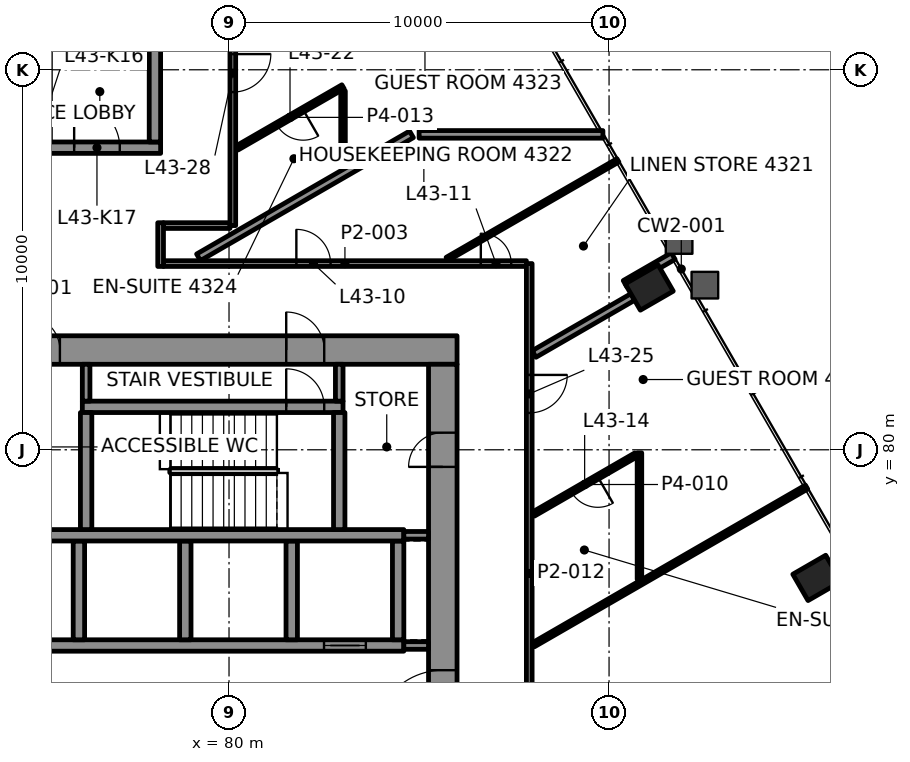
"""IFC4 building model, lengths in metres.
Left out: names, types, materials, properties, quantities, classifications, styles, units other than length and angle.
Written with IfcOpenShell. Run it as: python <this file> out.ifc"""

import sys

from ifc_helpers import new_model, si_unit, direction, frame, frame_2d, origin, origin_2d, place, context, subcontext, project, spatial, rectangle, hollow_rectangle, extrude, element, fill, save


model = new_model("IFC4")
c1 = context("Model", 3, precision=1e-05, world=origin(), true_north=direction((0.0, 1.0)))
c2 = subcontext(c1, "Body", "Model", "MODEL_VIEW")
j1 = project(units=[si_unit("LENGTHUNIT", "METRE"), si_unit("PLANEANGLEUNIT", "RADIAN")], contexts=[c1])
p1 = place(None, origin())
s1 = spatial("IfcSite", under=j1, at=p1, CompositionType="ELEMENT")
p2 = place(p1, origin())
s2 = spatial("IfcBuilding", under=s1, at=p2, CompositionType="ELEMENT")
p3 = place(p2, frame((0.0, 0.0, 187.0)))
s3 = spatial("IfcBuildingStorey", under=s2, at=p3, CompositionType="ELEMENT", Elevation=187.0)
for number, where, z_axis, x_axis in (
    (1, (95.468, 76.628, -0.0), (0.0, 0.0, 1.0), (-0.5, 0.866, 0.0)),
    (2, (91.056, 84.27, -0.0), (0.0, 0.0, 1.0), (-0.5, 0.866, 0.0)),
):
    element("IfcColumn", number, at=place(p3, frame(where, z_axis=z_axis, x_axis=x_axis)), inside=s3, PredefinedType="COLUMN", context=c2, shape_type="SweptSolid", body=[
        extrude(hollow_rectangle(XDim=0.8, YDim=1.0, WallThickness=0.05, at=origin_2d()), origin(), (0.0, 0.0, 1.0), 3.9),
    ])
p4 = place(p3, frame((64.0, 82.625, 0.0), z_axis=(0.0, 0.0, 1.0), x_axis=(1.0, 0.0, 0.0)))
e3 = element("IfcWall", 3, at=p4, inside=s3, PredefinedType="SHEAR", context=c2, shape_type="SweptSolid", body=[
    extrude(rectangle(XDim=22.0, YDim=0.75, at=frame_2d((11.0, 0.0))), origin(), (0.0, 0.0, 1.0), 3.7),
])
p5 = place(p4, frame((3.695, 0.0, 0.0)))
e4 = element("IfcOpeningElement", 4, at=p5, cuts=e3, PredefinedType="OPENING", context=c2, shape_type="SweptSolid", body=[
    extrude(rectangle(XDim=1.0, YDim=2.1, at=frame_2d((0.5, 1.05))), frame((0.0, 0.385, 0.0), z_axis=(0.0, -1.0, 0.0), x_axis=(1.0, 0.0, 0.0)), (0.0, 0.0, 1.0), 0.77),
])
p6 = place(p4, frame((17.505, 0.0, 0.0)))
e5 = element("IfcOpeningElement", 5, at=p6, cuts=e3, PredefinedType="OPENING", context=c2, shape_type="SweptSolid", body=[
    extrude(rectangle(XDim=1.0, YDim=2.1, at=frame_2d((0.5, 1.05))), frame((0.0, 0.385, 0.0), z_axis=(0.0, -1.0, 0.0), x_axis=(1.0, 0.0, 0.0)), (0.0, 0.0, 1.0), 0.77),
])
p7 = place(p4, frame((10.65, 0.0, 0.0)))
e6 = element("IfcOpeningElement", 6, at=p7, cuts=e3, PredefinedType="OPENING", context=c2, shape_type="SweptSolid", body=[
    extrude(rectangle(XDim=0.9, YDim=2.1, at=frame_2d((0.45, 1.05))), frame((0.0, 0.385, 0.0), z_axis=(0.0, -1.0, 0.0), x_axis=(1.0, 0.0, 0.0)), (0.0, 0.0, 1.0), 0.77),
])
p8 = place(p3, frame((85.625, 67.75, 0.0), z_axis=(0.0, 0.0, 1.0), x_axis=(0.0, 1.0, 0.0)))
e7 = element("IfcWall", 7, at=p8, inside=s3, PredefinedType="SHEAR", context=c2, shape_type="SweptSolid", body=[
    extrude(rectangle(XDim=14.5, YDim=0.75, at=frame_2d((7.25, 0.0))), origin(), (0.0, 0.0, 1.0), 3.7),
])
p9 = place(p8, frame((4.65, 0.0, 0.0)))
e8 = element("IfcOpeningElement", 8, at=p9, cuts=e7, PredefinedType="OPENING", context=c2, shape_type="SweptSolid", body=[
    extrude(rectangle(XDim=1.8, YDim=2.1, at=frame_2d((0.9, 1.05))), frame((0.0, 0.385, 0.0), z_axis=(0.0, -1.0, 0.0), x_axis=(1.0, 0.0, 0.0)), (0.0, 0.0, 1.0), 0.77),
])
p10 = place(p8, frame((11.8, 0.0, 0.0)))
e9 = element("IfcOpeningElement", 9, at=p10, cuts=e7, PredefinedType="OPENING", context=c2, shape_type="SweptSolid", body=[
    extrude(rectangle(XDim=0.9, YDim=2.1, at=frame_2d((0.45, 1.05))), frame((0.0, 0.385, 0.0), z_axis=(0.0, -1.0, 0.0), x_axis=(1.0, 0.0, 0.0)), (0.0, 0.0, 1.0), 0.77),
])
p11 = place(p3, frame((70.3, 74.85, 0.0), z_axis=(0.0, 0.0, 1.0), x_axis=(1.0, 0.0, 0.0)))
e10 = element("IfcWall", 10, at=p11, inside=s3, PredefinedType="SHEAR", context=c2, shape_type="SweptSolid", body=[
    extrude(rectangle(XDim=14.3, YDim=0.3, at=frame_2d((7.15, 0.0))), origin(), (0.0, 0.0, 1.0), 3.7),
])
p12 = place(p11, frame((3.8, 0.0, 0.0)))
e11 = element("IfcOpeningElement", 11, at=p12, cuts=e10, PredefinedType="OPENING", context=c2, shape_type="SweptSolid", body=[
    extrude(rectangle(XDim=1.1, YDim=2.1, at=frame_2d((0.55, 1.05))), frame((0.0, 0.16, 0.0), z_axis=(0.0, -1.0, 0.0), x_axis=(1.0, 0.0, 0.0)), (0.0, 0.0, 1.0), 0.32),
])
p13 = place(p11, frame((12.2, 0.0, 0.0)))
e12 = element("IfcOpeningElement", 12, at=p13, cuts=e10, PredefinedType="OPENING", context=c2, shape_type="SweptSolid", body=[
    extrude(rectangle(XDim=1.1, YDim=2.1, at=frame_2d((0.55, 1.05))), frame((0.0, 0.16, 0.0), z_axis=(0.0, -1.0, 0.0), x_axis=(1.0, 0.0, 0.0)), (0.0, 0.0, 1.0), 0.32),
])
for number, where, z_axis, x_axis in (
    (13, (76.05, 75.0, 0.0), (0.0, 0.0, 1.0), (0.0, 1.0, 0.0)),
    (14, (78.85, 75.0, 0.0), (0.0, 0.0, 1.0), (0.0, 1.0, 0.0)),
    (15, (81.65, 75.0, 0.0), (0.0, 0.0, 1.0), (0.0, 1.0, 0.0)),
    (16, (84.45, 75.0, 0.0), (0.0, 0.0, 1.0), (0.0, 1.0, 0.0)),
):
    element("IfcWall", number, at=place(p3, frame(where, z_axis=z_axis, x_axis=x_axis)), inside=s3, PredefinedType="SHEAR", context=c2, shape_type="SweptSolid", body=[
        extrude(rectangle(XDim=2.6, YDim=0.3, at=frame_2d((1.3, 0.0))), origin(), (0.0, 0.0, 1.0), 3.7),
    ])
p14 = place(p3, frame((67.15, 77.75, 0.0), z_axis=(0.0, 0.0, 1.0), x_axis=(1.0, 0.0, 0.0)))
e17 = element("IfcWall", 17, at=p14, inside=s3, PredefinedType="SHEAR", context=c2, shape_type="SweptSolid", body=[
    extrude(rectangle(XDim=17.45, YDim=0.3, at=frame_2d((8.725, 0.0))), origin(), (0.0, 0.0, 1.0), 3.7),
])
p15 = place(p14, frame((0.545, 0.0, 0.0)))
e18 = element("IfcOpeningElement", 18, at=p15, cuts=e17, PredefinedType="OPENING", context=c2, shape_type="SweptSolid", body=[
    extrude(rectangle(XDim=1.0, YDim=2.1, at=frame_2d((0.5, 1.05))), frame((0.0, 0.16, 0.0), z_axis=(0.0, -1.0, 0.0), x_axis=(1.0, 0.0, 0.0)), (0.0, 0.0, 1.0), 0.32),
])
p16 = place(p3, frame((76.14, 81.13, 0.0), z_axis=(0.0, 0.0, 1.0), x_axis=(1.0, 0.0, 0.0)))
e19 = element("IfcWall", 19, at=p16, inside=s3, PredefinedType="SHEAR", context=c2, shape_type="SweptSolid", body=[
    extrude(rectangle(XDim=6.86, YDim=0.3, at=frame_2d((3.43, 0.0))), origin(), (0.0, 0.0, 1.0), 3.7),
])
p17 = place(p16, frame((5.365, 0.0, 0.0)))
e20 = element("IfcOpeningElement", 20, at=p17, cuts=e19, PredefinedType="OPENING", context=c2, shape_type="SweptSolid", body=[
    extrude(rectangle(XDim=1.0, YDim=2.1, at=frame_2d((0.5, 1.05))), frame((0.0, 0.16, 0.0), z_axis=(0.0, -1.0, 0.0), x_axis=(1.0, 0.0, 0.0)), (0.0, 0.0, 1.0), 0.32),
])
for number, where, z_axis, x_axis in (
    (21, (76.24, 77.9, 0.0), (0.0, 0.0, 1.0), (0.0, 1.0, 0.0)),
    (22, (82.9, 77.9, 0.0), (0.0, 0.0, 1.0), (0.0, 1.0, 0.0)),
):
    element("IfcWall", number, at=place(p3, frame(where, z_axis=z_axis, x_axis=x_axis)), inside=s3, PredefinedType="SHEAR", context=c2, shape_type="SweptSolid", body=[
        extrude(rectangle(XDim=3.08, YDim=0.3, at=frame_2d((1.54, 0.0))), origin(), (0.0, 0.0, 1.0), 3.7),
    ])
p18 = place(p3, frame((71.8, 87.95, 0.0), z_axis=(0.0, 0.0, 1.0), x_axis=(1.0, 0.0, 0.0)))
e23 = element("IfcWall", 23, at=p18, inside=s3, PredefinedType="SHEAR", context=c2, shape_type="SweptSolid", body=[
    extrude(rectangle(XDim=6.4, YDim=0.3, at=frame_2d((3.2, 0.0))), origin(), (0.0, 0.0, 1.0), 3.7),
])
p19 = place(p18, frame((1.325, 0.0, 0.0)))
e24 = element("IfcOpeningElement", 24, at=p19, cuts=e23, PredefinedType="OPENING", context=c2, shape_type="SweptSolid", body=[
    extrude(rectangle(XDim=1.0, YDim=2.1, at=frame_2d((0.5, 1.05))), frame((0.0, 0.16, 0.0), z_axis=(0.0, -1.0, 0.0), x_axis=(1.0, 0.0, 0.0)), (0.0, 0.0, 1.0), 0.32),
])
p20 = place(p18, frame((4.125, 0.0, 0.0)))
e25 = element("IfcOpeningElement", 25, at=p20, cuts=e23, PredefinedType="OPENING", context=c2, shape_type="SweptSolid", body=[
    extrude(rectangle(XDim=1.2, YDim=2.1, at=frame_2d((0.6, 1.05))), frame((0.0, 0.16, 0.0), z_axis=(0.0, -1.0, 0.0), x_axis=(1.0, 0.0, 0.0)), (0.0, 0.0, 1.0), 0.32),
])
p21 = place(p3, frame((78.05, 88.1, 0.0), z_axis=(0.0, 0.0, 1.0), x_axis=(0.0, 1.0, 0.0)))
e26 = element("IfcWall", 26, at=p21, inside=s3, PredefinedType="SHEAR", context=c2, shape_type="SweptSolid", body=[
    extrude(rectangle(XDim=6.2, YDim=0.3, at=frame_2d((3.1, 0.0))), origin(), (0.0, 0.0, 1.0), 3.7),
])
p22 = place(p3, frame((78.275, 84.9, 0.0), z_axis=(0.0, 0.0, 1.0), x_axis=(1.0, 0.0, 0.0)))
e27 = element("IfcWall", 27, at=p22, inside=s3, PredefinedType="PARTITIONING", context=c2, shape_type="SweptSolid", body=[
    extrude(rectangle(XDim=9.55, YDim=0.15, at=frame_2d((4.775, 0.0))), origin(), (0.0, 0.0, 1.0), 3.1),
])
p23 = place(p22, frame((3.497, 0.0, 0.0)))
e28 = element("IfcOpeningElement", 28, at=p23, cuts=e27, PredefinedType="OPENING", context=c2, shape_type="SweptSolid", body=[
    extrude(rectangle(XDim=0.9, YDim=2.1, at=frame_2d((0.45, 1.05))), frame((0.0, 0.085, 0.0), z_axis=(0.0, -1.0, 0.0), x_axis=(1.0, 0.0, 0.0)), (0.0, 0.0, 1.0), 0.17),
])
p24 = place(p22, frame((8.351, 0.0, 0.0)))
e29 = element("IfcOpeningElement", 29, at=p24, cuts=e27, PredefinedType="OPENING", context=c2, shape_type="SweptSolid", body=[
    extrude(rectangle(XDim=0.8, YDim=2.1, at=frame_2d((0.4, 1.05))), frame((0.0, 0.085, 0.0), z_axis=(0.0, -1.0, 0.0), x_axis=(1.0, 0.0, 0.0)), (0.0, 0.0, 1.0), 0.17),
])
p25 = place(p3, frame((78.275, 85.9, 0.0), z_axis=(0.0, 0.0, 1.0), x_axis=(1.0, 0.0, 0.0)))
e30 = element("IfcWall", 30, at=p25, inside=s3, PredefinedType="PARTITIONING", context=c2, shape_type="SweptSolid", body=[
    extrude(rectangle(XDim=1.75, YDim=0.15, at=frame_2d((0.875, 0.0))), origin(), (0.0, 0.0, 1.0), 3.1),
])
p26 = place(p3, frame((83.06, 87.8, 0.0), z_axis=(0.0, 0.0, 1.0), x_axis=(1.0, 0.0, 0.0)))
e31 = element("IfcWall", 31, at=p26, inside=s3, PredefinedType="PARTITIONING", context=c2, shape_type="SweptSolid", body=[
    extrude(rectangle(XDim=0.564, YDim=0.12, at=frame_2d((0.282, 0.0))), origin(), (0.0, 0.0, 1.0), 3.1),
])
p27 = place(p3, frame((85.002, 88.3, 0.0), z_axis=(0.0, 0.0, 1.0), x_axis=(1.0, 0.0, 0.0)))
e32 = element("IfcWall", 32, at=p27, inside=s3, PredefinedType="PARTITIONING", context=c2, shape_type="SweptSolid", body=[
    extrude(rectangle(XDim=4.836, YDim=0.2, at=frame_2d((2.418, 0.0))), origin(), (0.0, 0.0, 1.0), 3.022),
])
p28 = place(p3, frame((88.01, 74.869, 0.0), z_axis=(0.0, 0.0, 1.0), x_axis=(0.866025877972, 0.499999178681, 0.0)))
e33 = element("IfcWall", 33, at=p28, inside=s3, PredefinedType="PARTITIONING", context=c2, shape_type="SweptSolid", body=[
    extrude(rectangle(XDim=8.299, YDim=0.12, at=frame_2d((4.149, 0.0))), origin(), (0.0, 0.0, 1.0), 3.022),
])
p29 = place(p3, frame((90.705, 79.865, 0.0), z_axis=(0.0, 0.0, 1.0), x_axis=(-0.866009247561, -0.500027982357, 0.0)))
e34 = element("IfcWall", 34, at=p29, inside=s3, PredefinedType="PARTITIONING", context=c2, shape_type="SweptSolid", body=[
    extrude(rectangle(XDim=3.113, YDim=0.12, at=frame_2d((1.556, 0.0))), origin(), (0.0, 0.0, 1.0), 3.1),
])
p30 = place(p29, frame((1.156, 0.0, 0.0)))
e35 = element("IfcOpeningElement", 35, at=p30, cuts=e34, PredefinedType="OPENING", context=c2, shape_type="SweptSolid", body=[
    extrude(rectangle(XDim=0.8, YDim=2.1, at=frame_2d((0.4, 1.05))), frame((0.0, 0.07, 0.0), z_axis=(0.0, -1.0, 0.0), x_axis=(1.0, 0.0, 0.0)), (0.0, 0.0, 1.0), 0.14),
])
p31 = place(p3, frame((88.027, 82.521, 0.0), z_axis=(0.0, 0.0, 1.0), x_axis=(0.866029639064, 0.499992664208, 0.0)))
e36 = element("IfcWall", 36, at=p31, inside=s3, PredefinedType="PARTITIONING", context=c2, shape_type="SweptSolid", body=[
    extrude(rectangle(XDim=2.998, YDim=0.2, at=frame_2d((1.499, 0.0))), origin(), (0.0, 0.0, 1.0), 3.1),
])
p32 = place(p3, frame((90.423, 84.367, 0.0), z_axis=(0.0, 0.0, 1.0), x_axis=(0.866032430508, 0.49998782916, 0.0)))
e37 = element("IfcWall", 37, at=p32, inside=s3, PredefinedType="PARTITIONING", context=c2, shape_type="SweptSolid", body=[
    extrude(rectangle(XDim=1.46, YDim=0.2, at=frame_2d((0.73, 0.0))), origin(), (0.0, 0.0, 1.0), 3.022),
])
p33 = place(p3, frame((85.737, 85.02, 0.0), z_axis=(0.0, 0.0, 1.0), x_axis=(0.866014867177, 0.500018249495, 0.0)))
e38 = element("IfcWall", 38, at=p33, inside=s3, PredefinedType="PARTITIONING", context=c2, shape_type="SweptSolid", body=[
    extrude(rectangle(XDim=5.192, YDim=0.1, at=frame_2d((2.596, 0.0))), origin(), (0.0, 0.0, 1.0), 3.022),
])
p34 = place(p3, frame((79.197, 85.065, 0.0), z_axis=(0.0, 0.0, 1.0), x_axis=(0.86602410867, 0.500002243197, 0.0)))
e39 = element("IfcWall", 39, at=p34, inside=s3, PredefinedType="PARTITIONING", context=c2, shape_type="SweptSolid", body=[
    extrude(rectangle(XDim=6.471, YDim=0.2, at=frame_2d((3.235, 0.0))), origin(), (0.0, 0.0, 1.0), 3.1),
])
p35 = place(p3, frame((83.0, 89.553, 0.0), z_axis=(0.0, 0.0, 1.0), x_axis=(-0.86604299788, -0.499969524894, 0.0)))
e40 = element("IfcWall", 40, at=p35, inside=s3, PredefinedType="PARTITIONING", context=c2, shape_type="SweptSolid", body=[
    extrude(rectangle(XDim=3.222, YDim=0.12, at=frame_2d((1.611, 0.0))), origin(), (0.0, 0.0, 1.0), 3.1),
])
p36 = place(p35, frame((1.211, 0.0, 0.0)))
e41 = element("IfcOpeningElement", 41, at=p36, cuts=e40, PredefinedType="OPENING", context=c2, shape_type="SweptSolid", body=[
    extrude(rectangle(XDim=0.8, YDim=2.1, at=frame_2d((0.4, 1.05))), frame((0.0, 0.07, 0.0), z_axis=(0.0, -1.0, 0.0), x_axis=(1.0, 0.0, 0.0)), (0.0, 0.0, 1.0), 0.14),
])
p37 = place(p3, frame((90.8, 76.59, 0.0), z_axis=(0.0, 0.0, 1.0), x_axis=(0.0, 1.0, 0.0)))
e42 = element("IfcWall", 42, at=p37, inside=s3, PredefinedType="PARTITIONING", context=c2, shape_type="SweptSolid", body=[
    extrude(rectangle(XDim=3.329, YDim=0.12, at=frame_2d((1.665, 0.0))), origin(), (0.0, 0.0, 1.0), 3.1),
])
p38 = place(p3, frame((87.9, 84.9, 0.0), z_axis=(0.0, 0.0, 1.0), x_axis=(0.0, -1.0, 0.0)))
e43 = element("IfcWall", 43, at=p38, inside=s3, PredefinedType="PARTITIONING", context=c2, shape_type="SweptSolid", body=[
    extrude(rectangle(XDim=16.308, YDim=0.15, at=frame_2d((8.154, 0.0))), origin(), (0.0, 0.0, 1.0), 3.1),
])
p39 = place(p38, frame((2.93, 0.0, 0.0)))
e44 = element("IfcOpeningElement", 44, at=p39, cuts=e43, PredefinedType="OPENING", context=c2, shape_type="SweptSolid", body=[
    extrude(rectangle(XDim=1.0, YDim=2.1, at=frame_2d((0.5, 1.05))), frame((0.0, 0.085, 0.0), z_axis=(0.0, -1.0, 0.0), x_axis=(1.0, 0.0, 0.0)), (0.0, 0.0, 1.0), 0.17),
])
p40 = place(p38, frame((12.5, 0.0, 0.0)))
e45 = element("IfcOpeningElement", 45, at=p40, cuts=e43, PredefinedType="OPENING", context=c2, shape_type="SweptSolid", body=[
    extrude(rectangle(XDim=1.2, YDim=2.1, at=frame_2d((0.6, 1.05))), frame((0.0, 0.085, 0.0), z_axis=(0.0, -1.0, 0.0), x_axis=(1.0, 0.0, 0.0)), (0.0, 0.0, 1.0), 0.17),
])
p41 = place(p3, frame((83.0, 87.8, 0.0), z_axis=(0.0, 0.0, 1.0), x_axis=(0.0, 1.0, 0.0)))
e46 = element("IfcWall", 46, at=p41, inside=s3, PredefinedType="PARTITIONING", context=c2, shape_type="SweptSolid", body=[
    extrude(rectangle(XDim=1.644, YDim=0.12, at=frame_2d((0.822, 0.0))), origin(), (0.0, 0.0, 1.0), 3.1),
])
p42 = place(p3, frame((80.1, 96.5, 0.0), z_axis=(0.0, 0.0, 1.0), x_axis=(0.0, -1.0, 0.0)))
e47 = element("IfcWall", 47, at=p42, inside=s3, PredefinedType="PARTITIONING", context=c2, shape_type="SweptSolid", body=[
    extrude(rectangle(XDim=10.6, YDim=0.15, at=frame_2d((5.3, 0.0))), origin(), (0.0, 0.0, 1.0), 3.022),
])
p43 = place(p42, frame((0.377, 0.0, 0.0)))
e48 = element("IfcOpeningElement", 48, at=p43, cuts=e47, PredefinedType="OPENING", context=c2, shape_type="SweptSolid", body=[
    extrude(rectangle(XDim=1.0, YDim=2.1, at=frame_2d((0.5, 1.05))), frame((0.0, 0.085, 0.0), z_axis=(0.0, -1.0, 0.0), x_axis=(1.0, 0.0, 0.0)), (0.0, 0.0, 1.0), 0.17),
])
p44 = place(p42, frame((6.087, 0.0, 0.0)))
e49 = element("IfcOpeningElement", 49, at=p44, cuts=e47, PredefinedType="OPENING", context=c2, shape_type="SweptSolid", body=[
    extrude(rectangle(XDim=1.0, YDim=2.1, at=frame_2d((0.5, 1.05))), frame((0.0, 0.085, 0.0), z_axis=(0.0, -1.0, 0.0), x_axis=(1.0, 0.0, 0.0)), (0.0, 0.0, 1.0), 0.17),
])
p45 = place(p3, frame((78.2, 84.825, 0.0), z_axis=(0.0, 0.0, 1.0), x_axis=(0.0, 1.0, 0.0)))
e50 = element("IfcWall", 50, at=p45, inside=s3, PredefinedType="PARTITIONING", context=c2, shape_type="SweptSolid", body=[
    extrude(rectangle(XDim=1.15, YDim=0.15, at=frame_2d((0.575, 0.0))), origin(), (0.0, 0.0, 1.0), 3.1),
])
for number, where, z_axis, x_axis in (
    (51, (84.6, 74.85, 0.0), (0.0, 0.0, 1.0), (1.0, 0.0, 0.0)),
    (52, (84.6, 77.75, 0.0), (0.0, 0.0, 1.0), (1.0, 0.0, 0.0)),
):
    element("IfcWall", number, at=place(p3, frame(where, z_axis=z_axis, x_axis=x_axis)), inside=s3, PredefinedType="PARTITIONING", context=c2, shape_type="SweptSolid", body=[
        extrude(rectangle(XDim=0.65, YDim=0.2, at=frame_2d((0.325, 0.0))), origin(), (0.0, 0.0, 1.0), 3.7),
    ])
for number, where, z_axis, x_axis in (
    (53, (76.24, 81.28, 0.0), (0.0, 0.0, 1.0), (0.0, 1.0, 0.0)),
    (54, (82.9, 81.28, 0.0), (0.0, 0.0, 1.0), (0.0, 1.0, 0.0)),
):
    element("IfcWall", number, at=place(p3, frame(where, z_axis=z_axis, x_axis=x_axis)), inside=s3, PredefinedType="PARTITIONING", context=c2, shape_type="SweptSolid", body=[
        extrude(rectangle(XDim=0.97, YDim=0.2, at=frame_2d((0.485, 0.0))), origin(), (0.0, 0.0, 1.0), 3.7),
    ])
p46 = place(p23, origin())
e55 = element("IfcDoor", 55, at=p46, inside=s3, OperationType="SINGLE_SWING_LEFT", PredefinedType="DOOR", context=c2, shape_type="SweptSolid", body=[
    extrude(rectangle(XDim=0.9, YDim=2.1, at=frame_2d((0.45, 1.05))), frame((0.0, 0.025, 0.0), z_axis=(0.0, -1.0, 0.0), x_axis=(1.0, 0.0, 0.0)), (0.0, 0.0, 1.0), 0.05),
])
fill(e28, e55)
p47 = place(p24, origin())
e56 = element("IfcDoor", 56, at=p47, inside=s3, OperationType="SINGLE_SWING_RIGHT", PredefinedType="DOOR", context=c2, shape_type="SweptSolid", body=[
    extrude(rectangle(XDim=0.8, YDim=2.1, at=frame_2d((0.4, 1.05))), frame((0.0, 0.025, 0.0), z_axis=(0.0, -1.0, 0.0), x_axis=(1.0, 0.0, 0.0)), (0.0, 0.0, 1.0), 0.05),
])
fill(e29, e56)
p48 = place(p30, origin())
e57 = element("IfcDoor", 57, at=p48, inside=s3, OperationType="SINGLE_SWING_RIGHT", PredefinedType="DOOR", context=c2, shape_type="SweptSolid", body=[
    extrude(rectangle(XDim=0.8, YDim=2.1, at=frame_2d((0.4, 1.05))), frame((0.0, 0.025, 0.0), z_axis=(0.0, -1.0, 0.0), x_axis=(1.0, 0.0, 0.0)), (0.0, 0.0, 1.0), 0.05),
])
fill(e35, e57)
p49 = place(p36, origin())
e58 = element("IfcDoor", 58, at=p49, inside=s3, OperationType="SINGLE_SWING_RIGHT", PredefinedType="DOOR", context=c2, shape_type="SweptSolid", body=[
    extrude(rectangle(XDim=0.8, YDim=2.1, at=frame_2d((0.4, 1.05))), frame((0.0, 0.025, 0.0), z_axis=(0.0, -1.0, 0.0), x_axis=(1.0, 0.0, 0.0)), (0.0, 0.0, 1.0), 0.05),
])
fill(e41, e58)
p50 = place(p39, origin())
e59 = element("IfcDoor", 59, at=p50, inside=s3, OperationType="SINGLE_SWING_LEFT", PredefinedType="DOOR", context=c2, shape_type="SweptSolid", body=[
    extrude(rectangle(XDim=1.0, YDim=2.1, at=frame_2d((0.5, 1.05))), frame((0.0, 0.025, 0.0), z_axis=(0.0, -1.0, 0.0), x_axis=(1.0, 0.0, 0.0)), (0.0, 0.0, 1.0), 0.05),
])
fill(e44, e59)
p51 = place(p44, origin())
e60 = element("IfcDoor", 60, at=p51, inside=s3, OperationType="SINGLE_SWING_LEFT", PredefinedType="DOOR", context=c2, shape_type="SweptSolid", body=[
    extrude(rectangle(XDim=1.0, YDim=2.1, at=frame_2d((0.5, 1.05))), frame((0.0, 0.025, 0.0), z_axis=(0.0, -1.0, 0.0), x_axis=(1.0, 0.0, 0.0)), (0.0, 0.0, 1.0), 0.05),
])
fill(e49, e60)
p52 = place(p13, origin())
e61 = element("IfcDoor", 61, at=p52, inside=s3, OperationType="DOUBLE_DOOR_SLIDING", PredefinedType="DOOR", context=c2, shape_type="SweptSolid", body=[
    extrude(rectangle(XDim=1.1, YDim=2.1, at=frame_2d((0.55, 1.05))), frame((0.0, 0.025, 0.0), z_axis=(0.0, -1.0, 0.0), x_axis=(1.0, 0.0, 0.0)), (0.0, 0.0, 1.0), 0.05),
])
fill(e12, e61)
p53 = place(p17, origin())
e62 = element("IfcDoor", 62, at=p53, inside=s3, OperationType="SINGLE_SWING_RIGHT", PredefinedType="DOOR", context=c2, shape_type="SweptSolid", body=[
    extrude(rectangle(XDim=1.0, YDim=2.1, at=frame_2d((0.5, 1.05))), frame((0.0, 0.025, 0.0), z_axis=(0.0, -1.0, 0.0), x_axis=(1.0, 0.0, 0.0)), (0.0, 0.0, 1.0), 0.05),
])
fill(e20, e62)
p54 = place(p6, origin())
e63 = element("IfcDoor", 63, at=p54, inside=s3, OperationType="SINGLE_SWING_LEFT", PredefinedType="DOOR", context=c2, shape_type="SweptSolid", body=[
    extrude(rectangle(XDim=1.0, YDim=2.1, at=frame_2d((0.5, 1.05))), frame((0.0, 0.095, 0.0), z_axis=(0.0, -1.0, 0.0), x_axis=(1.0, 0.0, 0.0)), (0.0, 0.0, 1.0), 0.19),
])
fill(e5, e63)
p55 = place(p20, origin())
e64 = element("IfcDoor", 64, at=p55, inside=s3, OperationType="SINGLE_SWING_RIGHT", PredefinedType="DOOR", context=c2, shape_type="SweptSolid", body=[
    extrude(rectangle(XDim=1.2, YDim=2.1, at=frame_2d((0.6, 1.05))), frame((0.0, 0.025, 0.0), z_axis=(0.0, -1.0, 0.0), x_axis=(1.0, 0.0, 0.0)), (0.0, 0.0, 1.0), 0.05),
])
fill(e25, e64)
p56 = place(p9, origin())
e65 = element("IfcDoor", 65, at=p56, inside=s3, OperationType="SINGLE_SWING_RIGHT", PredefinedType="DOOR", context=c2, shape_type="SweptSolid", body=[
    extrude(rectangle(XDim=1.8, YDim=2.1, at=frame_2d((0.9, 1.05))), frame((0.0, 0.095, 0.0), z_axis=(0.0, -1.0, 0.0), x_axis=(1.0, 0.0, 0.0)), (0.0, 0.0, 1.0), 0.19),
])
fill(e8, e65)
p57 = place(p7, origin())
e66 = element("IfcDoor", 66, at=p57, inside=s3, OperationType="SINGLE_SWING_LEFT", PredefinedType="DOOR", context=c2, shape_type="SweptSolid", body=[
    extrude(rectangle(XDim=0.9, YDim=2.1, at=frame_2d((0.45, 1.05))), frame((0.0, 0.095, 0.0), z_axis=(0.0, -1.0, 0.0), x_axis=(1.0, 0.0, 0.0)), (0.0, 0.0, 1.0), 0.19),
])
fill(e6, e66)
p58 = place(p10, origin())
e67 = element("IfcDoor", 67, at=p58, inside=s3, OperationType="SINGLE_SWING_RIGHT", PredefinedType="DOOR", context=c2, shape_type="SweptSolid", body=[
    extrude(rectangle(XDim=0.9, YDim=2.1, at=frame_2d((0.45, 1.05))), frame((0.0, 0.095, 0.0), z_axis=(0.0, -1.0, 0.0), x_axis=(1.0, 0.0, 0.0)), (0.0, 0.0, 1.0), 0.19),
])
fill(e9, e67)
save(model, sys.argv[1])
